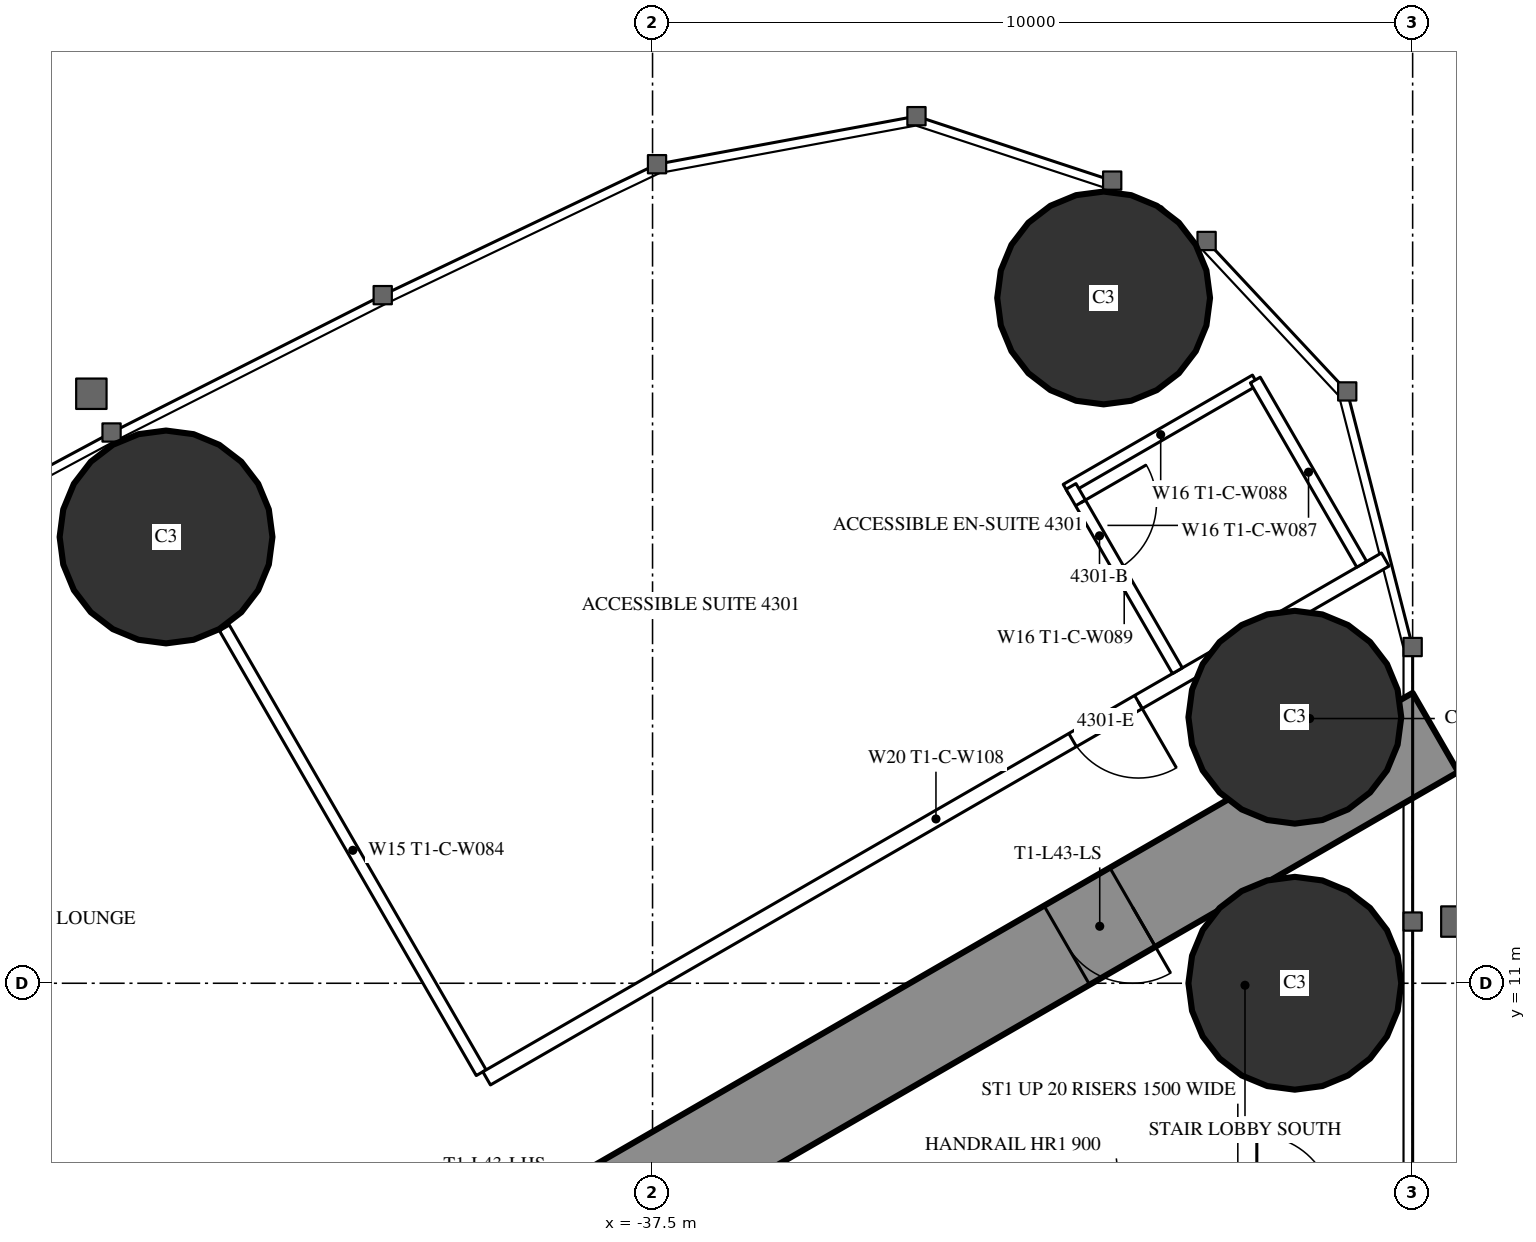
"""IFC4 building model, lengths in metres.
Left out: names, types, materials, properties, quantities, classifications, styles, units other than length and angle.
Written with IfcOpenShell. Run it as: python <this file> out.ifc"""

import sys

from ifc_helpers import new_model, si_unit, direction, frame, frame_2d, origin, origin_2d, place, context, subcontext, project, spatial, rectangle, circle, extrude, element, fill, save


model = new_model("IFC4")
c1 = context("Model", 3, precision=1e-05, world=origin(), true_north=direction((0.0, 1.0)))
c2 = subcontext(c1, "Body", "Model", "MODEL_VIEW")
j1 = project(units=[si_unit("LENGTHUNIT", "METRE"), si_unit("PLANEANGLEUNIT", "RADIAN")], contexts=[c1])
p1 = place(None, origin())
s1 = spatial("IfcSite", under=j1, at=p1, CompositionType="ELEMENT")
p2 = place(p1, origin())
s2 = spatial("IfcBuilding", under=s1, at=p2, CompositionType="ELEMENT")
p3 = place(p2, frame((0.0, 0.0, 163.3)))
s3 = spatial("IfcBuildingStorey", under=s2, at=p3, CompositionType="ELEMENT", Elevation=163.3)
for number, where, z_axis, x_axis in (
    (1, (-31.565, 20.016, 0.0), (0.0, 0.0, 1.0), (1.0, 0.0, 0.0)),
    (2, (-29.05, 11.0, 0.0), (0.0, 0.0, 1.0), (1.0, 0.0, 0.0)),
    (3, (-29.05, 14.5, 0.0), (0.0, 0.0, 1.0), (1.0, 0.0, 0.0)),
    (4, (-43.9, 16.871, 0.0), (0.0, 0.0, 1.0), (1.0, 0.0, 0.0)),
):
    element("IfcColumn", number, at=place(p3, frame(where, z_axis=z_axis, x_axis=x_axis)), inside=s3, PredefinedType="COLUMN", context=c2, shape_type="SweptSolid", body=[
        extrude(circle(Radius=1.4, at=origin_2d()), origin(), (0.0, 0.0, 1.0), 3.5),
    ])
p4 = place(p3, frame((-27.2, 14.3, 0.0), z_axis=(0.0, 0.0, 1.0), x_axis=(-0.866026593062, -0.499997940104, 0.0)))
e5 = element("IfcWall", 5, at=p4, inside=s3, PredefinedType="SHEAR", context=c2, shape_type="SweptSolid", body=[
    extrude(rectangle(XDim=28.946, YDim=1.2, at=frame_2d((14.473, 0.0))), origin(), (0.0, 0.0, 1.0), 3.5),
])
p5 = place(p4, frame((4.6, 0.0, 0.0)))
e6 = element("IfcOpeningElement", 6, at=p5, cuts=e5, PredefinedType="OPENING", context=c2, shape_type="SweptSolid", body=[
    extrude(rectangle(XDim=1.0, YDim=2.2, at=frame_2d((0.5, 1.1))), frame((0.0, 0.61, 0.0), z_axis=(0.0, -1.0, 0.0), x_axis=(1.0, 0.0, 0.0)), (0.0, 0.0, 1.0), 1.22),
])
p6 = place(p4, frame((13.395, 0.0, 0.0)))
e7 = element("IfcOpeningElement", 7, at=p6, cuts=e5, PredefinedType="OPENING", context=c2, shape_type="SweptSolid", body=[
    extrude(rectangle(XDim=1.8, YDim=2.2, at=frame_2d((0.9, 1.1))), frame((0.0, 0.61, 0.0), z_axis=(0.0, -1.0, 0.0), x_axis=(1.0, 0.0, 0.0)), (0.0, 0.0, 1.0), 1.22),
])
p7 = place(p3, frame((-39.754, 9.823, 0.0), z_axis=(0.0, 0.0, 1.0), x_axis=(-0.499997670926, 0.866026748472, 0.0)))
e8 = element("IfcWall", 8, at=p7, inside=s3, PredefinedType="PARTITIONING", context=c2, shape_type="SweptSolid", body=[
    extrude(rectangle(XDim=6.757, YDim=0.15, at=frame_2d((3.379, 0.0))), origin(), (0.0, 0.0, 1.0), 2.3),
])
p8 = place(p3, frame((-27.86, 16.575, 0.0), z_axis=(0.0, 0.0, 1.0), x_axis=(-0.866026850238, -0.499997494661, 0.0)))
e9 = element("IfcWall", 9, at=p8, inside=s3, PredefinedType="PARTITIONING", context=c2, shape_type="SweptSolid", body=[
    extrude(rectangle(XDim=13.651, YDim=0.2, at=frame_2d((6.826, 0.0))), origin(), (0.0, 0.0, 1.0), 3.25),
])
p9 = place(p8, frame((3.75, 0.0, 0.0)))
e10 = element("IfcOpeningElement", 10, at=p9, cuts=e9, PredefinedType="OPENING", context=c2, shape_type="SweptSolid", body=[
    extrude(rectangle(XDim=1.0, YDim=2.2, at=frame_2d((0.5, 1.1))), frame((0.0, 0.11, 0.0), z_axis=(0.0, -1.0, 0.0), x_axis=(1.0, 0.0, 0.0)), (0.0, 0.0, 1.0), 0.22),
])
p10 = place(p3, frame((-29.57, 18.936, 0.0), z_axis=(0.0, 0.0, 1.0), x_axis=(-0.866018712932, -0.500011588718, 0.0)))
e11 = element("IfcWall", 11, at=p10, inside=s3, PredefinedType="PARTITIONING", context=c2, shape_type="SweptSolid", body=[
    extrude(rectangle(XDim=2.875, YDim=0.15, at=frame_2d((1.438, 0.0))), origin(), (0.0, 0.0, 1.0), 3.25),
])
p11 = place(p3, frame((-30.595, 15.111, 0.0), z_axis=(0.0, 0.0, 1.0), x_axis=(-0.49998411664, 0.866034573852, 0.0)))
e12 = element("IfcWall", 12, at=p11, inside=s3, PredefinedType="PARTITIONING", context=c2, shape_type="SweptSolid", body=[
    extrude(rectangle(XDim=2.8, YDim=0.15, at=frame_2d((1.4, 0.0))), origin(), (0.0, 0.0, 1.0), 3.25),
])
p12 = place(p11, frame((1.55, 0.0, 0.0)))
e13 = element("IfcOpeningElement", 13, at=p12, cuts=e12, PredefinedType="OPENING", context=c2, shape_type="SweptSolid", body=[
    extrude(rectangle(XDim=1.0, YDim=2.2, at=frame_2d((0.5, 1.1))), frame((0.0, 0.085, 0.0), z_axis=(0.0, -1.0, 0.0), x_axis=(1.0, 0.0, 0.0)), (0.0, 0.0, 1.0), 0.17),
])
p13 = place(p3, frame((-28.17, 16.511, 0.0), z_axis=(0.0, 0.0, 1.0), x_axis=(-0.49994636267, 0.866056369097, 0.0)))
e14 = element("IfcWall", 14, at=p13, inside=s3, PredefinedType="PARTITIONING", context=c2, shape_type="SweptSolid", body=[
    extrude(rectangle(XDim=2.8, YDim=0.15, at=frame_2d((1.4, 0.0))), origin(), (0.0, 0.0, 1.0), 3.25),
])
p14 = place(p12, origin())
e15 = element("IfcDoor", 15, at=p14, inside=s3, OperationType="SINGLE_SWING_RIGHT", PredefinedType="DOOR", context=c2, shape_type="SweptSolid", body=[
    extrude(rectangle(XDim=1.0, YDim=2.2, at=frame_2d((0.5, 1.1))), frame((0.0, 0.025, 0.0), z_axis=(0.0, -1.0, 0.0), x_axis=(1.0, 0.0, 0.0)), (0.0, 0.0, 1.0), 0.05),
])
fill(e13, e15)
p15 = place(p9, origin())
e16 = element("IfcDoor", 16, at=p15, inside=s3, OperationType="SINGLE_SWING_LEFT", PredefinedType="DOOR", context=c2, shape_type="SweptSolid", body=[
    extrude(rectangle(XDim=1.0, YDim=2.2, at=frame_2d((0.5, 1.1))), frame((0.0, 0.025, 0.0), z_axis=(0.0, -1.0, 0.0), x_axis=(1.0, 0.0, 0.0)), (0.0, 0.0, 1.0), 0.05),
])
fill(e10, e16)
p16 = place(p5, origin())
e17 = element("IfcDoor", 17, at=p16, inside=s3, OperationType="SINGLE_SWING_LEFT", PredefinedType="DOOR", context=c2, shape_type="SweptSolid", body=[
    extrude(rectangle(XDim=1.0, YDim=2.2, at=frame_2d((0.5, 1.1))), frame((0.0, 0.025, 0.0), z_axis=(0.0, -1.0, 0.0), x_axis=(1.0, 0.0, 0.0)), (0.0, 0.0, 1.0), 0.05),
])
fill(e6, e17)
save(model, sys.argv[1])
